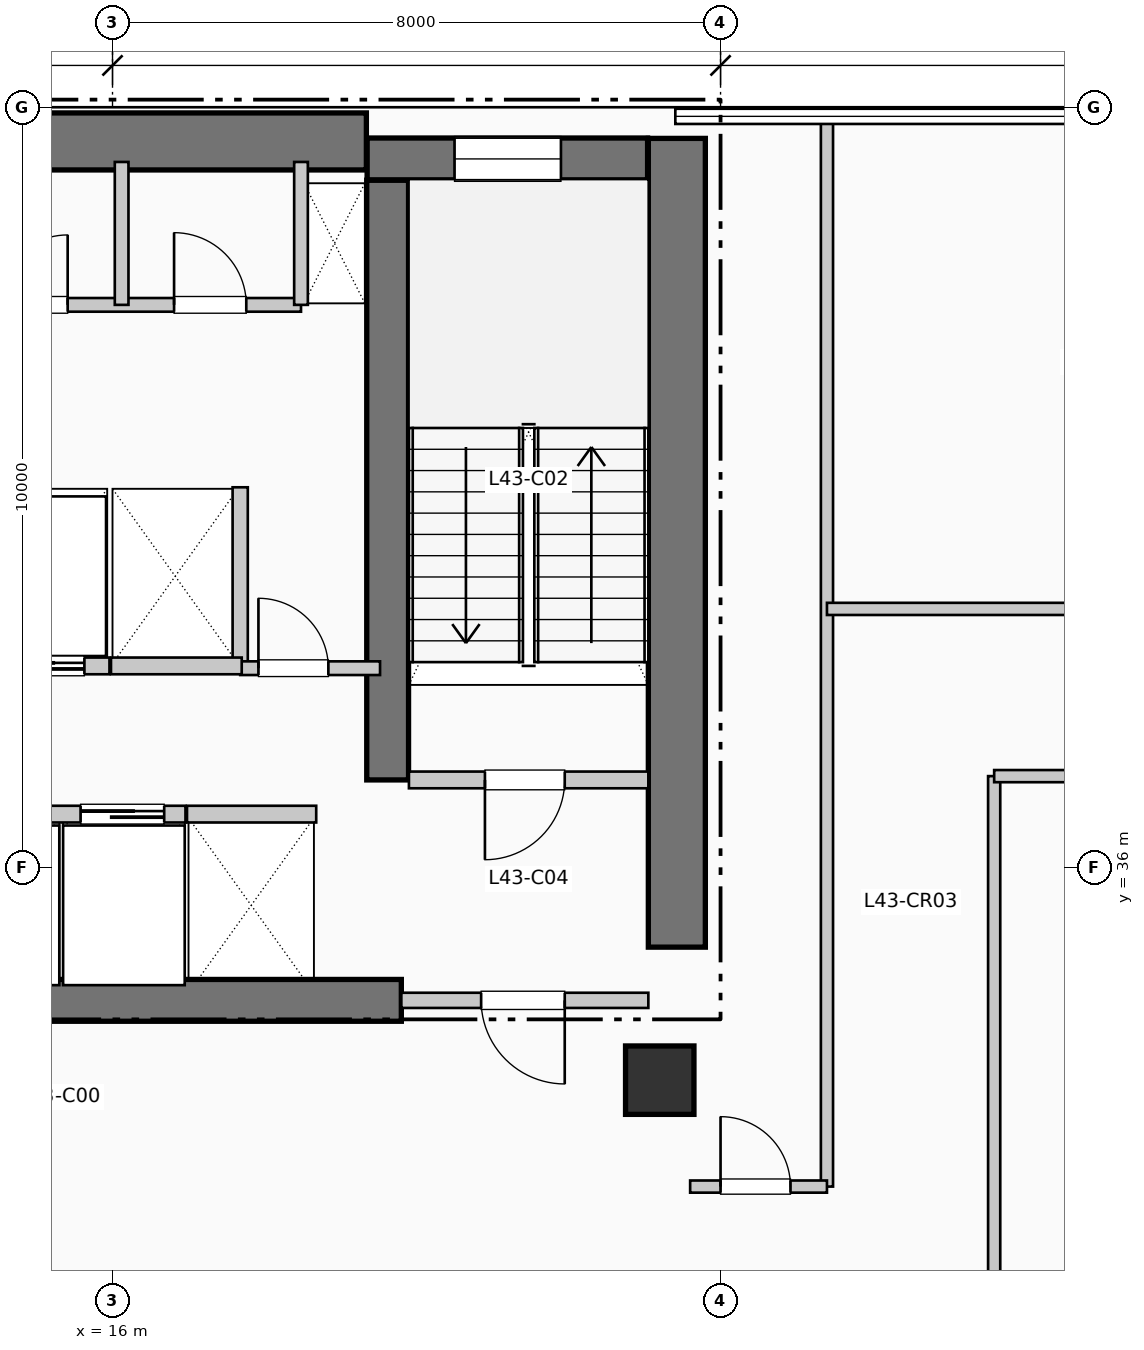
"""IFC4 building model, lengths in metres.
Left out: names, types, materials, properties, quantities, classifications, styles, units other than length and angle.
Written with IfcOpenShell. Run it as: python <this file> out.ifc"""

import sys

from ifc_helpers import new_model, si_unit, direction, frame, frame_2d, origin, origin_2d, place, context, subcontext, project, spatial, rectangle, extrude, element, fill, save


model = new_model("IFC4")
c1 = context("Model", 3, precision=1e-05, world=origin(), true_north=direction((0.0, 1.0)))
c2 = subcontext(c1, "Body", "Model", "MODEL_VIEW")
j1 = project(units=[si_unit("LENGTHUNIT", "METRE"), si_unit("PLANEANGLEUNIT", "RADIAN")], contexts=[c1])
p1 = place(None, origin())
s1 = spatial("IfcSite", under=j1, at=p1, CompositionType="ELEMENT")
p2 = place(p1, origin())
s2 = spatial("IfcBuilding", under=s1, at=p2, CompositionType="ELEMENT")
p3 = place(p2, frame((0.0, 0.0, 179.52)))
s3 = spatial("IfcBuildingStorey", under=s2, at=p3, CompositionType="ELEMENT", Elevation=179.52)
p4 = place(p3, frame((5.36, 45.55, 0.0), z_axis=(0.0, 0.0, 1.0), x_axis=(1.0, 0.0, 0.0)))
e1 = element("IfcWall", 1, at=p4, inside=s3, PredefinedType="SHEAR", context=c2, shape_type="SweptSolid", body=[
    extrude(rectangle(XDim=13.98, YDim=0.75, at=frame_2d((6.99, 0.0))), origin(), (0.0, 0.0, 1.0), 3.96),
])
p5 = place(p3, frame((23.425, 34.95, 0.0), z_axis=(0.0, 0.0, 1.0), x_axis=(0.0, 1.0, 0.0)))
e2 = element("IfcWall", 2, at=p5, inside=s3, PredefinedType="SHEAR", context=c2, shape_type="SweptSolid", body=[
    extrude(rectangle(XDim=10.64, YDim=0.75, at=frame_2d((5.32, 0.0))), origin(), (0.0, 0.0, 1.0), 3.96),
])
p6 = place(p3, frame((13.68, 34.25, 0.0), z_axis=(0.0, 0.0, 1.0), x_axis=(1.0, 0.0, 0.0)))
e3 = element("IfcWall", 3, at=p6, inside=s3, PredefinedType="SHEAR", context=c2, shape_type="SweptSolid", body=[
    extrude(rectangle(XDim=6.12, YDim=0.55, at=frame_2d((3.06, 0.0))), origin(), (0.0, 0.0, 1.0), 3.96),
])
p7 = place(p3, frame((19.62, 37.15, 0.0), z_axis=(0.0, 0.0, 1.0), x_axis=(0.0, 1.0, 0.0)))
e4 = element("IfcWall", 4, at=p7, inside=s3, PredefinedType="SHEAR", context=c2, shape_type="SweptSolid", body=[
    extrude(rectangle(XDim=7.89, YDim=0.55, at=frame_2d((3.945, 0.0))), origin(), (0.0, 0.0, 1.0), 3.96),
])
p8 = place(p3, frame((19.35, 45.32, 0.0), z_axis=(0.0, 0.0, 1.0), x_axis=(1.0, 0.0, 0.0)))
e5 = element("IfcWall", 5, at=p8, inside=s3, PredefinedType="SHEAR", context=c2, shape_type="SweptSolid", body=[
    extrude(rectangle(XDim=3.69, YDim=0.55, at=frame_2d((1.845, 0.0))), origin(), (0.0, 0.0, 1.0), 3.96),
])
p9 = place(p8, frame((1.15, 0.0, 1.05)))
e6 = element("IfcOpeningElement", 6, at=p9, cuts=e5, PredefinedType="OPENING", context=c2, shape_type="SweptSolid", body=[
    extrude(rectangle(XDim=1.4, YDim=1.8, at=frame_2d((0.7, 0.9))), frame((0.0, 0.285, 0.0), z_axis=(0.0, -1.0, 0.0), x_axis=(1.0, 0.0, 0.0)), (0.0, 0.0, 1.0), 0.57),
])
p10 = place(p3, frame((23.2, 33.2, 0.0), z_axis=(0.0, 0.0, 1.0), x_axis=(1.0, 0.0, 0.0)))
e7 = element("IfcColumn", 7, at=p10, inside=s3, PredefinedType="COLUMN", context=c2, shape_type="SweptSolid", body=[
    extrude(rectangle(XDim=0.9, YDim=0.9, at=origin_2d()), origin(), (0.0, 0.0, 1.0), 3.96),
])
p11 = place(p3, frame((19.9, 37.15, 0.0), z_axis=(0.0, 0.0, 1.0), x_axis=(1.0, 0.0, 0.0)))
e8 = element("IfcWall", 8, at=p11, inside=s3, PredefinedType="PARTITIONING", context=c2, shape_type="SweptSolid", body=[
    extrude(rectangle(XDim=3.15, YDim=0.22, at=frame_2d((1.575, 0.0))), origin(), (0.0, 0.0, 1.0), 3.71),
])
p12 = place(p11, frame((2.05, 0.0, 0.0), z_axis=(0.0, 0.0, 1.0), x_axis=(-1.0, 0.0, 0.0)))
e9 = element("IfcOpeningElement", 9, at=p12, cuts=e8, PredefinedType="OPENING", context=c2, shape_type="SweptSolid", body=[
    extrude(rectangle(XDim=1.05, YDim=2.15, at=frame_2d((0.525, 1.075))), frame((0.0, 0.12, 0.0), z_axis=(0.0, -1.0, 0.0), x_axis=(1.0, 0.0, 0.0)), (0.0, 0.0, 1.0), 0.24),
])
p13 = place(p3, frame((19.8, 34.25, 0.0), z_axis=(0.0, 0.0, 1.0), x_axis=(1.0, 0.0, 0.0)))
e10 = element("IfcWall", 10, at=p13, inside=s3, PredefinedType="PARTITIONING", context=c2, shape_type="SweptSolid", body=[
    extrude(rectangle(XDim=3.25, YDim=0.2, at=frame_2d((1.625, 0.0))), origin(), (0.0, 0.0, 1.0), 3.71),
])
p14 = place(p13, frame((2.15, 0.0, 0.0), z_axis=(0.0, 0.0, 1.0), x_axis=(-1.0, 0.0, 0.0)))
e11 = element("IfcOpeningElement", 11, at=p14, cuts=e10, PredefinedType="OPENING", context=c2, shape_type="SweptSolid", body=[
    extrude(rectangle(XDim=1.1, YDim=2.15, at=frame_2d((0.55, 1.075))), frame((0.0, 0.11, 0.0), z_axis=(0.0, -1.0, 0.0), x_axis=(1.0, 0.0, 0.0)), (0.0, 0.0, 1.0), 0.22),
])
p15 = place(p3, frame((17.68, 38.65, 0.0), z_axis=(0.0, 0.0, 1.0), x_axis=(0.0, 1.0, 0.0)))
e12 = element("IfcWall", 12, at=p15, inside=s3, PredefinedType="PARTITIONING", context=c2, shape_type="SweptSolid", body=[
    extrude(rectangle(XDim=2.35, YDim=0.2, at=frame_2d((1.175, 0.0))), origin(), (0.0, 0.0, 1.0), 3.71),
])
p16 = place(p3, frame((17.68, 38.62, 0.0), z_axis=(0.0, 0.0, 1.0), x_axis=(1.0, 0.0, 0.0)))
e13 = element("IfcWall", 13, at=p16, inside=s3, PredefinedType="PARTITIONING", context=c2, shape_type="SweptSolid", body=[
    extrude(rectangle(XDim=1.84, YDim=0.18, at=frame_2d((0.92, 0.0))), origin(), (0.0, 0.0, 1.0), 3.71),
])
p17 = place(p16, frame((0.24, 0.0, 0.0)))
e14 = element("IfcOpeningElement", 14, at=p17, cuts=e13, PredefinedType="OPENING", context=c2, shape_type="SweptSolid", body=[
    extrude(rectangle(XDim=0.92, YDim=2.1, at=frame_2d((0.46, 1.05))), frame((0.0, 0.1, 0.0), z_axis=(0.0, -1.0, 0.0), x_axis=(1.0, 0.0, 0.0)), (0.0, 0.0, 1.0), 0.2),
])
p18 = place(p3, frame((13.68, 36.7, 0.0), z_axis=(0.0, 0.0, 1.0), x_axis=(1.0, 0.0, 0.0)))
e15 = element("IfcWall", 15, at=p18, inside=s3, PredefinedType="PARTITIONING", context=c2, shape_type="SweptSolid", body=[
    extrude(rectangle(XDim=3.28, YDim=0.22, at=frame_2d((1.64, 0.0))), origin(), (0.0, 0.0, 1.0), 3.71),
])
p19 = place(p18, frame((0.28, 0.0, 0.0)))
e16 = element("IfcOpeningElement", 16, at=p19, cuts=e15, PredefinedType="OPENING", context=c2, shape_type="SweptSolid", body=[
    extrude(rectangle(XDim=1.1, YDim=2.2, at=frame_2d((0.55, 1.1))), frame((0.0, 0.12, 0.0), z_axis=(0.0, -1.0, 0.0), x_axis=(1.0, 0.0, 0.0)), (0.0, 0.0, 1.0), 0.24),
])
p20 = place(p18, frame((1.9, 0.0, 0.0)))
e17 = element("IfcOpeningElement", 17, at=p20, cuts=e15, PredefinedType="OPENING", context=c2, shape_type="SweptSolid", body=[
    extrude(rectangle(XDim=1.1, YDim=2.2, at=frame_2d((0.55, 1.1))), frame((0.0, 0.12, 0.0), z_axis=(0.0, -1.0, 0.0), x_axis=(1.0, 0.0, 0.0)), (0.0, 0.0, 1.0), 0.24),
])
p21 = place(p3, frame((12.58, 38.65, 0.0), z_axis=(0.0, 0.0, 1.0), x_axis=(1.0, 0.0, 0.0)))
e18 = element("IfcWall", 18, at=p21, inside=s3, PredefinedType="PARTITIONING", context=c2, shape_type="SweptSolid", body=[
    extrude(rectangle(XDim=3.38, YDim=0.22, at=frame_2d((1.69, 0.0))), origin(), (0.0, 0.0, 1.0), 3.71),
])
p22 = place(p21, frame((0.3, 0.0, 0.0)))
e19 = element("IfcOpeningElement", 19, at=p22, cuts=e18, PredefinedType="OPENING", context=c2, shape_type="SweptSolid", body=[
    extrude(rectangle(XDim=1.1, YDim=2.2, at=frame_2d((0.55, 1.1))), frame((0.0, 0.12, 0.0), z_axis=(0.0, -1.0, 0.0), x_axis=(1.0, 0.0, 0.0)), (0.0, 0.0, 1.0), 0.24),
])
p23 = place(p21, frame((1.95, 0.0, 0.0)))
e20 = element("IfcOpeningElement", 20, at=p23, cuts=e18, PredefinedType="OPENING", context=c2, shape_type="SweptSolid", body=[
    extrude(rectangle(XDim=1.1, YDim=2.2, at=frame_2d((0.55, 1.1))), frame((0.0, 0.12, 0.0), z_axis=(0.0, -1.0, 0.0), x_axis=(1.0, 0.0, 0.0)), (0.0, 0.0, 1.0), 0.24),
])
p24 = place(p3, frame((16.98, 36.7, 0.0), z_axis=(0.0, 0.0, 1.0), x_axis=(1.0, 0.0, 0.0)))
e21 = element("IfcWall", 21, at=p24, inside=s3, PredefinedType="PARTITIONING", context=c2, shape_type="SweptSolid", body=[
    extrude(rectangle(XDim=1.7, YDim=0.22, at=frame_2d((0.85, 0.0))), origin(), (0.0, 0.0, 1.0), 3.71),
])
p25 = place(p3, frame((15.98, 38.65, 0.0), z_axis=(0.0, 0.0, 1.0), x_axis=(1.0, 0.0, 0.0)))
e22 = element("IfcWall", 22, at=p25, inside=s3, PredefinedType="PARTITIONING", context=c2, shape_type="SweptSolid", body=[
    extrude(rectangle(XDim=1.72, YDim=0.22, at=frame_2d((0.86, 0.0))), origin(), (0.0, 0.0, 1.0), 3.71),
])
p26 = place(p3, frame((9.15, 43.4, 0.0), z_axis=(0.0, 0.0, 1.0), x_axis=(1.0, 0.0, 0.0)))
e23 = element("IfcWall", 23, at=p26, inside=s3, PredefinedType="PLUMBINGWALL", context=c2, shape_type="SweptSolid", body=[
    extrude(rectangle(XDim=9.33, YDim=0.18, at=frame_2d((4.665, 0.0))), origin(), (0.0, 0.0, 1.0), 3.71),
])
p27 = place(p26, frame((0.72, 0.0, 0.0)))
e24 = element("IfcOpeningElement", 24, at=p27, cuts=e23, PredefinedType="OPENING", context=c2, shape_type="SweptSolid", body=[
    extrude(rectangle(XDim=0.92, YDim=2.1, at=frame_2d((0.46, 1.05))), frame((0.0, 0.1, 0.0), z_axis=(0.0, -1.0, 0.0), x_axis=(1.0, 0.0, 0.0)), (0.0, 0.0, 1.0), 0.2),
])
p28 = place(p26, frame((3.02, 0.0, 0.0)))
e25 = element("IfcOpeningElement", 25, at=p28, cuts=e23, PredefinedType="OPENING", context=c2, shape_type="SweptSolid", body=[
    extrude(rectangle(XDim=0.92, YDim=2.1, at=frame_2d((0.46, 1.05))), frame((0.0, 0.1, 0.0), z_axis=(0.0, -1.0, 0.0), x_axis=(1.0, 0.0, 0.0)), (0.0, 0.0, 1.0), 0.2),
])
p29 = place(p26, frame((5.34, 0.0, 0.0)))
e26 = element("IfcOpeningElement", 26, at=p29, cuts=e23, PredefinedType="OPENING", context=c2, shape_type="SweptSolid", body=[
    extrude(rectangle(XDim=0.92, YDim=2.1, at=frame_2d((0.46, 1.05))), frame((0.0, 0.1, 0.0), z_axis=(0.0, -1.0, 0.0), x_axis=(1.0, 0.0, 0.0)), (0.0, 0.0, 1.0), 0.2),
])
p30 = place(p26, frame((7.66, 0.0, 0.0)))
e27 = element("IfcOpeningElement", 27, at=p30, cuts=e23, PredefinedType="OPENING", context=c2, shape_type="SweptSolid", body=[
    extrude(rectangle(XDim=0.95, YDim=2.1, at=frame_2d((0.475, 1.05))), frame((0.0, 0.1, 0.0), z_axis=(0.0, -1.0, 0.0), x_axis=(1.0, 0.0, 0.0)), (0.0, 0.0, 1.0), 0.2),
])
for number, where, z_axis, x_axis in (
    (28, (18.48, 43.4, 0.0), (0.0, 0.0, 1.0), (0.0, 1.0, 0.0)),
    (29, (16.12, 43.4, 0.0), (0.0, 0.0, 1.0), (0.0, 1.0, 0.0)),
):
    element("IfcWall", number, at=place(p3, frame(where, z_axis=z_axis, x_axis=x_axis)), inside=s3, PredefinedType="PLUMBINGWALL", context=c2, shape_type="SweptSolid", body=[
        extrude(rectangle(XDim=1.88, YDim=0.18, at=frame_2d((0.94, 0.0))), origin(), (0.0, 0.0, 1.0), 3.71),
    ])
p31 = place(p3, frame((25.4, 31.8, 0.0), z_axis=(0.0, 0.0, 1.0), x_axis=(0.0, 1.0, 0.0)))
e30 = element("IfcWall", 30, at=p31, inside=s3, PredefinedType="PARTITIONING", context=c2, shape_type="SweptSolid", body=[
    extrude(rectangle(XDim=14.01, YDim=0.16, at=frame_2d((7.005, 0.0))), origin(), (0.0, 0.0, 1.0), 3.71),
])
p32 = place(p3, frame((27.6, 22.19, 0.0), z_axis=(0.0, 0.0, 1.0), x_axis=(0.0, 1.0, 0.0)))
e31 = element("IfcWall", 31, at=p32, inside=s3, PredefinedType="PARTITIONING", context=c2, shape_type="SweptSolid", body=[
    extrude(rectangle(XDim=15.01, YDim=0.16, at=frame_2d((7.505, 0.0))), origin(), (0.0, 0.0, 1.0), 3.71),
])
p33 = place(p32, frame((2.15, 0.0, 0.0), z_axis=(0.0, 0.0, 1.0), x_axis=(-1.0, 0.0, 0.0)))
e32 = element("IfcOpeningElement", 32, at=p33, cuts=e31, PredefinedType="OPENING", context=c2, shape_type="SweptSolid", body=[
    extrude(rectangle(XDim=0.95, YDim=2.15, at=frame_2d((0.475, 1.075))), frame((0.0, 0.09, 0.0), z_axis=(0.0, -1.0, 0.0), x_axis=(1.0, 0.0, 0.0)), (0.0, 0.0, 1.0), 0.18),
])
p34 = place(p3, frame((27.6, 37.2, 0.0), z_axis=(0.0, 0.0, 1.0), x_axis=(1.0, 0.0, 0.0)))
e33 = element("IfcWall", 33, at=p34, inside=s3, PredefinedType="PARTITIONING", context=c2, shape_type="SweptSolid", body=[
    extrude(rectangle(XDim=22.41, YDim=0.16, at=frame_2d((11.205, 0.0))), origin(), (0.0, 0.0, 1.0), 3.71),
])
p35 = place(p34, frame((6.077, 0.0, 0.0), z_axis=(0.0, 0.0, 1.0), x_axis=(-1.0, 0.0, 0.0)))
e34 = element("IfcOpeningElement", 34, at=p35, cuts=e33, PredefinedType="OPENING", context=c2, shape_type="SweptSolid", body=[
    extrude(rectangle(XDim=0.95, YDim=2.15, at=frame_2d((0.475, 1.075))), frame((0.0, 0.09, 0.0), z_axis=(0.0, -1.0, 0.0), x_axis=(1.0, 0.0, 0.0)), (0.0, 0.0, 1.0), 0.18),
])
p36 = place(p34, frame((17.282, 0.0, 0.0), z_axis=(0.0, 0.0, 1.0), x_axis=(-1.0, 0.0, 0.0)))
e35 = element("IfcOpeningElement", 35, at=p36, cuts=e33, PredefinedType="OPENING", context=c2, shape_type="SweptSolid", body=[
    extrude(rectangle(XDim=0.95, YDim=2.15, at=frame_2d((0.475, 1.075))), frame((0.0, 0.09, 0.0), z_axis=(0.0, -1.0, 0.0), x_axis=(1.0, 0.0, 0.0)), (0.0, 0.0, 1.0), 0.18),
])
p37 = place(p3, frame((25.4, 39.4, 0.0), z_axis=(0.0, 0.0, 1.0), x_axis=(1.0, 0.0, 0.0)))
e36 = element("IfcWall", 36, at=p37, inside=s3, PredefinedType="PARTITIONING", context=c2, shape_type="SweptSolid", body=[
    extrude(rectangle(XDim=24.61, YDim=0.16, at=frame_2d((12.305, 0.0))), origin(), (0.0, 0.0, 1.0), 3.365),
])
p38 = place(p37, frame((3.709, 0.0, 0.0)))
e37 = element("IfcOpeningElement", 37, at=p38, cuts=e36, PredefinedType="OPENING", context=c2, shape_type="SweptSolid", body=[
    extrude(rectangle(XDim=0.95, YDim=2.15, at=frame_2d((0.475, 1.075))), frame((0.0, 0.09, 0.0), z_axis=(0.0, -1.0, 0.0), x_axis=(1.0, 0.0, 0.0)), (0.0, 0.0, 1.0), 0.18),
])
p39 = place(p37, frame((12.076, 0.0, 0.0)))
e38 = element("IfcOpeningElement", 38, at=p39, cuts=e36, PredefinedType="OPENING", context=c2, shape_type="SweptSolid", body=[
    extrude(rectangle(XDim=0.95, YDim=2.15, at=frame_2d((0.475, 1.075))), frame((0.0, 0.09, 0.0), z_axis=(0.0, -1.0, 0.0), x_axis=(1.0, 0.0, 0.0)), (0.0, 0.0, 1.0), 0.18),
])
p40 = place(p37, frame((20.198, 0.0, 0.0)))
e39 = element("IfcOpeningElement", 39, at=p40, cuts=e36, PredefinedType="OPENING", context=c2, shape_type="SweptSolid", body=[
    extrude(rectangle(XDim=0.95, YDim=2.15, at=frame_2d((0.475, 1.075))), frame((0.0, 0.09, 0.0), z_axis=(0.0, -1.0, 0.0), x_axis=(1.0, 0.0, 0.0)), (0.0, 0.0, 1.0), 0.18),
])
p41 = place(p3, frame((23.6, 31.8, 0.0), z_axis=(0.0, 0.0, 1.0), x_axis=(1.0, 0.0, 0.0)))
e40 = element("IfcWall", 40, at=p41, inside=s3, PredefinedType="PARTITIONING", context=c2, shape_type="SweptSolid", body=[
    extrude(rectangle(XDim=1.8, YDim=0.16, at=frame_2d((0.9, 0.0))), origin(), (0.0, 0.0, 1.0), 3.71),
])
p42 = place(p41, frame((0.4, 0.0, 0.0)))
e41 = element("IfcOpeningElement", 41, at=p42, cuts=e40, PredefinedType="OPENING", context=c2, shape_type="SweptSolid", body=[
    extrude(rectangle(XDim=0.92, YDim=2.1, at=frame_2d((0.46, 1.05))), frame((0.0, 0.09, 0.0), z_axis=(0.0, -1.0, 0.0), x_axis=(1.0, 0.0, 0.0)), (0.0, 0.0, 1.0), 0.18),
])
p43 = place(p9, origin())
e42 = element("IfcWindow", 42, at=p43, inside=s3, PartitioningType="SINGLE_PANEL", PredefinedType="WINDOW", context=c2, shape_type="SweptSolid", body=[
    extrude(rectangle(XDim=1.4, YDim=1.8, at=frame_2d((0.7, 0.9))), frame((0.0, 0.03, 0.0), z_axis=(0.0, -1.0, 0.0), x_axis=(1.0, 0.0, 0.0)), (0.0, 0.0, 1.0), 0.06),
])
fill(e6, e42)
p44 = place(p12, origin())
e43 = element("IfcDoor", 43, at=p44, inside=s3, OperationType="SINGLE_SWING_LEFT", PredefinedType="DOOR", context=c2, shape_type="SweptSolid", body=[
    extrude(rectangle(XDim=1.05, YDim=2.15, at=frame_2d((0.525, 1.075))), frame((0.0, 0.025, 0.0), z_axis=(0.0, -1.0, 0.0), x_axis=(1.0, 0.0, 0.0)), (0.0, 0.0, 1.0), 0.05),
])
fill(e9, e43)
p45 = place(p14, origin())
e44 = element("IfcDoor", 44, at=p45, inside=s3, OperationType="SINGLE_SWING_RIGHT", PredefinedType="DOOR", context=c2, shape_type="SweptSolid", body=[
    extrude(rectangle(XDim=1.1, YDim=2.15, at=frame_2d((0.55, 1.075))), frame((0.0, 0.025, 0.0), z_axis=(0.0, -1.0, 0.0), x_axis=(1.0, 0.0, 0.0)), (0.0, 0.0, 1.0), 0.05),
])
fill(e11, e44)
p46 = place(p17, origin())
e45 = element("IfcDoor", 45, at=p46, inside=s3, OperationType="SINGLE_SWING_LEFT", PredefinedType="DOOR", context=c2, shape_type="SweptSolid", body=[
    extrude(rectangle(XDim=0.92, YDim=2.1, at=frame_2d((0.46, 1.05))), frame((0.0, 0.025, 0.0), z_axis=(0.0, -1.0, 0.0), x_axis=(1.0, 0.0, 0.0)), (0.0, 0.0, 1.0), 0.05),
])
fill(e14, e45)
p47 = place(p20, origin())
e46 = element("IfcDoor", 46, at=p47, inside=s3, OperationType="SLIDING_TO_RIGHT", PredefinedType="DOOR", context=c2, shape_type="SweptSolid", body=[
    extrude(rectangle(XDim=1.1, YDim=2.2, at=frame_2d((0.55, 1.1))), frame((0.0, 0.025, 0.0), z_axis=(0.0, -1.0, 0.0), x_axis=(1.0, 0.0, 0.0)), (0.0, 0.0, 1.0), 0.05),
])
fill(e17, e46)
p48 = place(p23, origin())
e47 = element("IfcDoor", 47, at=p48, inside=s3, OperationType="SLIDING_TO_RIGHT", PredefinedType="DOOR", context=c2, shape_type="SweptSolid", body=[
    extrude(rectangle(XDim=1.1, YDim=2.2, at=frame_2d((0.55, 1.1))), frame((0.0, 0.025, 0.0), z_axis=(0.0, -1.0, 0.0), x_axis=(1.0, 0.0, 0.0)), (0.0, 0.0, 1.0), 0.05),
])
fill(e20, e47)
p49 = place(p29, origin())
e48 = element("IfcDoor", 48, at=p49, inside=s3, OperationType="SINGLE_SWING_RIGHT", PredefinedType="DOOR", context=c2, shape_type="SweptSolid", body=[
    extrude(rectangle(XDim=0.92, YDim=2.1, at=frame_2d((0.46, 1.05))), frame((0.0, 0.025, 0.0), z_axis=(0.0, -1.0, 0.0), x_axis=(1.0, 0.0, 0.0)), (0.0, 0.0, 1.0), 0.05),
])
fill(e26, e48)
p50 = place(p30, origin())
e49 = element("IfcDoor", 49, at=p50, inside=s3, OperationType="SINGLE_SWING_LEFT", PredefinedType="DOOR", context=c2, shape_type="SweptSolid", body=[
    extrude(rectangle(XDim=0.95, YDim=2.1, at=frame_2d((0.475, 1.05))), frame((0.0, 0.025, 0.0), z_axis=(0.0, -1.0, 0.0), x_axis=(1.0, 0.0, 0.0)), (0.0, 0.0, 1.0), 0.05),
])
fill(e27, e49)
p51 = place(p42, origin())
e50 = element("IfcDoor", 50, at=p51, inside=s3, OperationType="SINGLE_SWING_LEFT", PredefinedType="DOOR", context=c2, shape_type="SweptSolid", body=[
    extrude(rectangle(XDim=0.92, YDim=2.1, at=frame_2d((0.46, 1.05))), frame((0.0, 0.025, 0.0), z_axis=(0.0, -1.0, 0.0), x_axis=(1.0, 0.0, 0.0)), (0.0, 0.0, 1.0), 0.05),
])
fill(e41, e50)
save(model, sys.argv[1])
